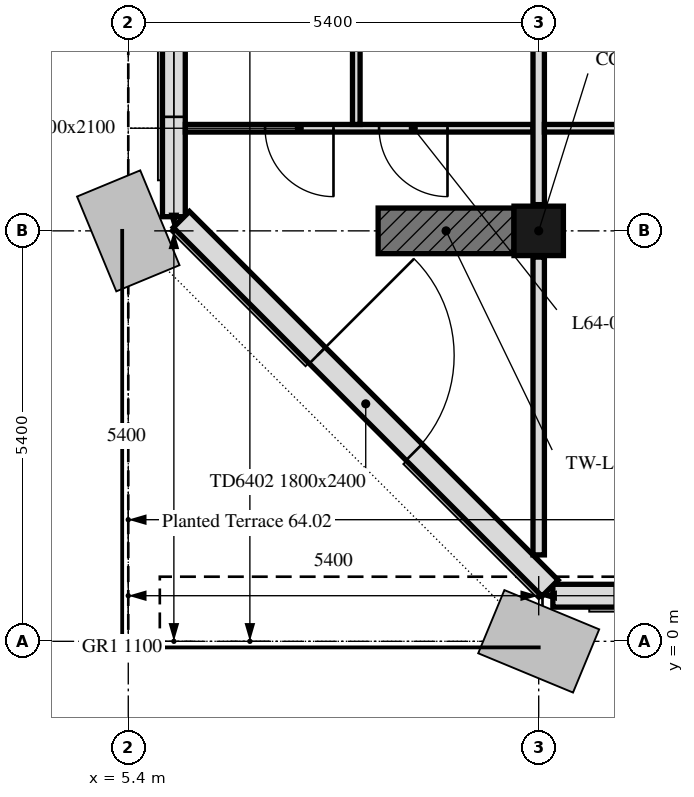
"""IFC4 building model, lengths in metres.
Left out: names, types, materials, properties, quantities, classifications, styles, units other than length and angle.
Written with IfcOpenShell. Run it as: python <this file> out.ifc"""

import sys

from ifc_helpers import new_model, si_unit, direction, frame, frame_2d, origin, origin_2d, place, context, subcontext, project, spatial, rectangle, extrude, element, fill, save


model = new_model("IFC4")
c1 = context("Model", 3, precision=1e-05, world=origin(), true_north=direction((0.0, 1.0)))
c2 = subcontext(c1, "Body", "Model", "MODEL_VIEW")
j1 = project(units=[si_unit("LENGTHUNIT", "METRE"), si_unit("PLANEANGLEUNIT", "RADIAN")], contexts=[c1])
p1 = place(None, origin())
s1 = spatial("IfcSite", under=j1, at=p1, CompositionType="ELEMENT")
p2 = place(p1, origin())
s2 = spatial("IfcBuilding", under=s1, at=p2, CompositionType="ELEMENT")
p3 = place(p2, frame((0.0, 0.0, 265.3)))
s3 = spatial("IfcBuildingStorey", under=s2, at=p3, CompositionType="ELEMENT", Elevation=265.3)
p4 = place(p3, frame((10.8, 5.4, 0.0), z_axis=(0.0, 0.0, 1.0), x_axis=(1.0, 0.0, 0.0)))
e1 = element("IfcColumn", 1, at=p4, inside=s3, PredefinedType="COLUMN", context=c2, shape_type="SweptSolid", body=[
    extrude(rectangle(XDim=0.65, YDim=0.65, at=origin_2d()), origin(), (0.0, 0.0, 1.0), 3.0),
])
p5 = place(p3, frame((8.688, 5.4, 0.0), z_axis=(0.0, 0.0, 1.0), x_axis=(1.0, 0.0, 0.0)))
e2 = element("IfcWall", 2, at=p5, inside=s3, PredefinedType="SHEAR", context=c2, shape_type="SweptSolid", body=[
    extrude(rectangle(XDim=1.788, YDim=0.6, at=frame_2d((0.894, 0.0))), origin(), (0.0, 0.0, 1.0), 3.0),
])
p6 = place(p3, frame((10.986, 0.6, 0.0), z_axis=(0.0, 0.0, 1.0), x_axis=(1.0, 0.0, 0.0)))
e3 = element("IfcWall", 3, at=p6, inside=s3, PredefinedType="SOLIDWALL", context=c2, shape_type="SweptSolid", body=[
    extrude(rectangle(XDim=32.027, YDim=0.3, at=frame_2d((16.014, 0.0))), origin(), (0.0, 0.0, 1.0), 3.0),
])
p7 = place(p6, frame((0.814, 0.0, 0.9)))
e4 = element("IfcOpeningElement", 4, at=p7, cuts=e3, PredefinedType="OPENING", context=c2, shape_type="SweptSolid", body=[
    extrude(rectangle(XDim=3.4, YDim=1.7, at=frame_2d((1.7, 0.85))), frame((0.0, 0.16, 0.0), z_axis=(0.0, -1.0, 0.0), x_axis=(1.0, 0.0, 0.0)), (0.0, 0.0, 1.0), 0.32),
])
p8 = place(p6, frame((7.664, 0.0, 0.9)))
e5 = element("IfcOpeningElement", 5, at=p8, cuts=e3, PredefinedType="OPENING", context=c2, shape_type="SweptSolid", body=[
    extrude(rectangle(XDim=0.5, YDim=1.7, at=frame_2d((0.25, 0.85))), frame((0.0, 0.16, 0.0), z_axis=(0.0, -1.0, 0.0), x_axis=(1.0, 0.0, 0.0)), (0.0, 0.0, 1.0), 0.32),
])
p9 = place(p6, frame((13.064, 0.0, 0.9)))
e6 = element("IfcOpeningElement", 6, at=p9, cuts=e3, PredefinedType="OPENING", context=c2, shape_type="SweptSolid", body=[
    extrude(rectangle(XDim=0.5, YDim=1.7, at=frame_2d((0.25, 0.85))), frame((0.0, 0.16, 0.0), z_axis=(0.0, -1.0, 0.0), x_axis=(1.0, 0.0, 0.0)), (0.0, 0.0, 1.0), 0.32),
])
p10 = place(p6, frame((18.464, 0.0, 0.9)))
e7 = element("IfcOpeningElement", 7, at=p10, cuts=e3, PredefinedType="OPENING", context=c2, shape_type="SweptSolid", body=[
    extrude(rectangle(XDim=0.5, YDim=1.7, at=frame_2d((0.25, 0.85))), frame((0.0, 0.16, 0.0), z_axis=(0.0, -1.0, 0.0), x_axis=(1.0, 0.0, 0.0)), (0.0, 0.0, 1.0), 0.32),
])
p11 = place(p6, frame((23.864, 0.0, 0.9)))
e8 = element("IfcOpeningElement", 8, at=p11, cuts=e3, PredefinedType="OPENING", context=c2, shape_type="SweptSolid", body=[
    extrude(rectangle(XDim=0.5, YDim=1.7, at=frame_2d((0.25, 0.85))), frame((0.0, 0.16, 0.0), z_axis=(0.0, -1.0, 0.0), x_axis=(1.0, 0.0, 0.0)), (0.0, 0.0, 1.0), 0.32),
])
p12 = place(p6, frame((28.164, 0.0, 0.9)))
e9 = element("IfcOpeningElement", 9, at=p12, cuts=e3, PredefinedType="OPENING", context=c2, shape_type="SweptSolid", body=[
    extrude(rectangle(XDim=1.1, YDim=1.7, at=frame_2d((0.55, 0.85))), frame((0.0, 0.16, 0.0), z_axis=(0.0, -1.0, 0.0), x_axis=(1.0, 0.0, 0.0)), (0.0, 0.0, 1.0), 0.32),
])
p13 = place(p3, frame((6.0, 16.2, 0.0), z_axis=(0.0, 0.0, 1.0), x_axis=(0.0, -1.0, 0.0)))
e10 = element("IfcWall", 10, at=p13, inside=s3, PredefinedType="SOLIDWALL", context=c2, shape_type="SweptSolid", body=[
    extrude(rectangle(XDim=10.614, YDim=0.3, at=frame_2d((5.307, 0.0))), origin(), (0.0, 0.0, 1.0), 3.0),
])
p14 = place(p13, frame((1.0, 0.0, 0.9)))
e11 = element("IfcOpeningElement", 11, at=p14, cuts=e10, PredefinedType="OPENING", context=c2, shape_type="SweptSolid", body=[
    extrude(rectangle(XDim=1.1, YDim=1.7, at=frame_2d((0.55, 0.85))), frame((0.0, 0.16, 0.0), z_axis=(0.0, -1.0, 0.0), x_axis=(1.0, 0.0, 0.0)), (0.0, 0.0, 1.0), 0.32),
])
p15 = place(p13, frame((2.95, 0.0, 0.9)))
e12 = element("IfcOpeningElement", 12, at=p15, cuts=e10, PredefinedType="OPENING", context=c2, shape_type="SweptSolid", body=[
    extrude(rectangle(XDim=1.1, YDim=1.7, at=frame_2d((0.55, 0.85))), frame((0.0, 0.16, 0.0), z_axis=(0.0, -1.0, 0.0), x_axis=(1.0, 0.0, 0.0)), (0.0, 0.0, 1.0), 0.32),
])
p16 = place(p13, frame((6.75, 0.0, 0.9)))
e13 = element("IfcOpeningElement", 13, at=p16, cuts=e10, PredefinedType="OPENING", context=c2, shape_type="SweptSolid", body=[
    extrude(rectangle(XDim=1.1, YDim=1.7, at=frame_2d((0.55, 0.85))), frame((0.0, 0.16, 0.0), z_axis=(0.0, -1.0, 0.0), x_axis=(1.0, 0.0, 0.0)), (0.0, 0.0, 1.0), 0.32),
])
p17 = place(p13, frame((8.2, 0.0, 0.9)))
e14 = element("IfcOpeningElement", 14, at=p17, cuts=e10, PredefinedType="OPENING", context=c2, shape_type="SweptSolid", body=[
    extrude(rectangle(XDim=1.1, YDim=1.7, at=frame_2d((0.55, 0.85))), frame((0.0, 0.16, 0.0), z_axis=(0.0, -1.0, 0.0), x_axis=(1.0, 0.0, 0.0)), (0.0, 0.0, 1.0), 0.32),
])
p18 = place(p3, frame((6.099, 5.55, 0.0), z_axis=(0.0, 0.0, 1.0), x_axis=(0.707106781187, -0.707106781187, 0.0)))
e15 = element("IfcWall", 15, at=p18, inside=s3, PredefinedType="SOLIDWALL", context=c2, shape_type="SweptSolid", body=[
    extrude(rectangle(XDim=6.86, YDim=0.3, at=frame_2d((3.43, 0.0))), origin(), (0.0, 0.0, 1.0), 3.0),
])
p19 = place(p18, frame((2.53, 0.0, 0.0)))
e16 = element("IfcOpeningElement", 16, at=p19, cuts=e15, PredefinedType="OPENING", context=c2, shape_type="SweptSolid", body=[
    extrude(rectangle(XDim=1.8, YDim=2.4, at=frame_2d((0.9, 1.2))), frame((0.0, 0.16, 0.0), z_axis=(0.0, -1.0, 0.0), x_axis=(1.0, 0.0, 0.0)), (0.0, 0.0, 1.0), 0.32),
])
p20 = place(p3, frame((10.725, 6.75, 0.0), z_axis=(0.0, 0.0, 1.0), x_axis=(-1.0, 0.0, 0.0)))
e17 = element("IfcWall", 17, at=p20, inside=s3, PredefinedType="PARTITIONING", context=c2, shape_type="SweptSolid", body=[
    extrude(rectangle(XDim=4.574, YDim=0.1, at=frame_2d((2.287, 0.0))), origin(), (0.0, 0.0, 1.0), 3.0),
])
p21 = place(p20, frame((2.625, 0.0, 0.0)))
e18 = element("IfcOpeningElement", 18, at=p21, cuts=e17, PredefinedType="OPENING", context=c2, shape_type="SweptSolid", body=[
    extrude(rectangle(XDim=0.9, YDim=2.1, at=frame_2d((0.45, 1.05))), frame((0.0, 0.05, 0.0), z_axis=(0.0, -1.0, 0.0), x_axis=(1.0, 0.0, 0.0)), (0.0, 0.0, 1.0), 0.1),
])
p22 = place(p20, frame((1.125, 0.0, 0.0)))
e19 = element("IfcOpeningElement", 19, at=p22, cuts=e17, PredefinedType="OPENING", context=c2, shape_type="SweptSolid", body=[
    extrude(rectangle(XDim=0.9, YDim=2.1, at=frame_2d((0.45, 1.05))), frame((0.0, 0.05, 0.0), z_axis=(0.0, -1.0, 0.0), x_axis=(1.0, 0.0, 0.0)), (0.0, 0.0, 1.0), 0.1),
])
p23 = place(p3, frame((10.8, 1.137, 0.0), z_axis=(0.0, 0.0, 1.0), x_axis=(0.0, 1.0, 0.0)))
e20 = element("IfcWall", 20, at=p23, inside=s3, PredefinedType="PARTITIONING", context=c2, shape_type="SweptSolid", body=[
    extrude(rectangle(XDim=3.918, YDim=0.15, at=frame_2d((1.959, 0.0))), origin(), (0.0, 0.0, 1.0), 3.0),
])
p24 = place(p3, frame((8.4, 6.8, 0.0), z_axis=(0.0, 0.0, 1.0), x_axis=(0.0, 1.0, 0.0)))
e21 = element("IfcWall", 21, at=p24, inside=s3, PredefinedType="PARTITIONING", context=c2, shape_type="SweptSolid", body=[
    extrude(rectangle(XDim=7.075, YDim=0.1, at=frame_2d((3.538, 0.0))), origin(), (0.0, 0.0, 1.0), 3.0),
])
p25 = place(p24, frame((5.45, 0.0, 0.0)))
e22 = element("IfcOpeningElement", 22, at=p25, cuts=e21, PredefinedType="OPENING", context=c2, shape_type="SweptSolid", body=[
    extrude(rectangle(XDim=0.9, YDim=2.1, at=frame_2d((0.45, 1.05))), frame((0.0, 0.05, 0.0), z_axis=(0.0, -1.0, 0.0), x_axis=(1.0, 0.0, 0.0)), (0.0, 0.0, 1.0), 0.1),
])
p26 = place(p24, frame((1.717, 0.0, 0.0)))
e23 = element("IfcOpeningElement", 23, at=p26, cuts=e21, PredefinedType="OPENING", context=c2, shape_type="SweptSolid", body=[
    extrude(rectangle(XDim=0.9, YDim=2.1, at=frame_2d((0.45, 1.05))), frame((0.0, 0.05, 0.0), z_axis=(0.0, -1.0, 0.0), x_axis=(1.0, 0.0, 0.0)), (0.0, 0.0, 1.0), 0.1),
])
p27 = place(p3, frame((10.8, 5.745, 0.0), z_axis=(0.0, 0.0, 1.0), x_axis=(0.0, 1.0, 0.0)))
e24 = element("IfcWall", 24, at=p27, inside=s3, PredefinedType="PARTITIONING", context=c2, shape_type="SweptSolid", body=[
    extrude(rectangle(XDim=4.71, YDim=0.15, at=frame_2d((2.355, 0.0))), origin(), (0.0, 0.0, 1.0), 3.0),
])
p28 = place(p3, frame((21.525, 6.75, 0.0), z_axis=(0.0, 0.0, 1.0), x_axis=(-1.0, 0.0, 0.0)))
e25 = element("IfcWall", 25, at=p28, inside=s3, PredefinedType="PARTITIONING", context=c2, shape_type="SweptSolid", body=[
    extrude(rectangle(XDim=10.65, YDim=0.1, at=frame_2d((5.325, 0.0))), origin(), (0.0, 0.0, 1.0), 2.4),
])
p29 = place(p28, frame((8.813, 0.0, 0.0)))
e26 = element("IfcOpeningElement", 26, at=p29, cuts=e25, PredefinedType="OPENING", context=c2, shape_type="SweptSolid", body=[
    extrude(rectangle(XDim=0.9, YDim=2.1, at=frame_2d((0.45, 1.05))), frame((0.0, 0.05, 0.0), z_axis=(0.0, -1.0, 0.0), x_axis=(1.0, 0.0, 0.0)), (0.0, 0.0, 1.0), 0.1),
])
p30 = place(p28, frame((1.675, 0.0, 0.0)))
e27 = element("IfcOpeningElement", 27, at=p30, cuts=e25, PredefinedType="OPENING", context=c2, shape_type="SweptSolid", body=[
    extrude(rectangle(XDim=0.9, YDim=2.1, at=frame_2d((0.45, 1.05))), frame((0.0, 0.05, 0.0), z_axis=(0.0, -1.0, 0.0), x_axis=(1.0, 0.0, 0.0)), (0.0, 0.0, 1.0), 0.1),
])
p31 = place(p28, frame((7.313, 0.0, 0.0)))
e28 = element("IfcOpeningElement", 28, at=p31, cuts=e25, PredefinedType="OPENING", context=c2, shape_type="SweptSolid", body=[
    extrude(rectangle(XDim=0.9, YDim=2.1, at=frame_2d((0.45, 1.05))), frame((0.0, 0.05, 0.0), z_axis=(0.0, -1.0, 0.0), x_axis=(1.0, 0.0, 0.0)), (0.0, 0.0, 1.0), 0.1),
])
p32 = place(p19, origin())
e29 = element("IfcDoor", 29, at=p32, inside=s3, OperationType="DOUBLE_DOOR_DOUBLE_SWING", PredefinedType="DOOR", context=c2, shape_type="SweptSolid", body=[
    extrude(rectangle(XDim=1.8, YDim=2.4, at=frame_2d((0.9, 1.2))), frame((0.0, 0.025, 0.0), z_axis=(0.0, -1.0, 0.0), x_axis=(1.0, 0.0, 0.0)), (0.0, 0.0, 1.0), 0.05),
])
fill(e16, e29)
p33 = place(p17, origin())
e30 = element("IfcWindow", 30, at=p33, inside=s3, PartitioningType="SINGLE_PANEL", PredefinedType="WINDOW", context=c2, shape_type="SweptSolid", body=[
    extrude(rectangle(XDim=1.1, YDim=1.7, at=frame_2d((0.55, 0.85))), frame((0.0, 0.03, 0.0), z_axis=(0.0, -1.0, 0.0), x_axis=(1.0, 0.0, 0.0)), (0.0, 0.0, 1.0), 0.06),
])
fill(e14, e30)
p34 = place(p21, origin())
e31 = element("IfcDoor", 31, at=p34, inside=s3, OperationType="SINGLE_SWING_RIGHT", PredefinedType="DOOR", context=c2, shape_type="SweptSolid", body=[
    extrude(rectangle(XDim=0.9, YDim=2.1, at=frame_2d((0.45, 1.05))), frame((0.0, 0.025, 0.0), z_axis=(0.0, -1.0, 0.0), x_axis=(1.0, 0.0, 0.0)), (0.0, 0.0, 1.0), 0.05),
])
fill(e18, e31)
p35 = place(p22, origin())
e32 = element("IfcDoor", 32, at=p35, inside=s3, OperationType="SINGLE_SWING_LEFT", PredefinedType="DOOR", context=c2, shape_type="SweptSolid", body=[
    extrude(rectangle(XDim=0.9, YDim=2.1, at=frame_2d((0.45, 1.05))), frame((0.0, 0.025, 0.0), z_axis=(0.0, -1.0, 0.0), x_axis=(1.0, 0.0, 0.0)), (0.0, 0.0, 1.0), 0.05),
])
fill(e19, e32)
save(model, sys.argv[1])
